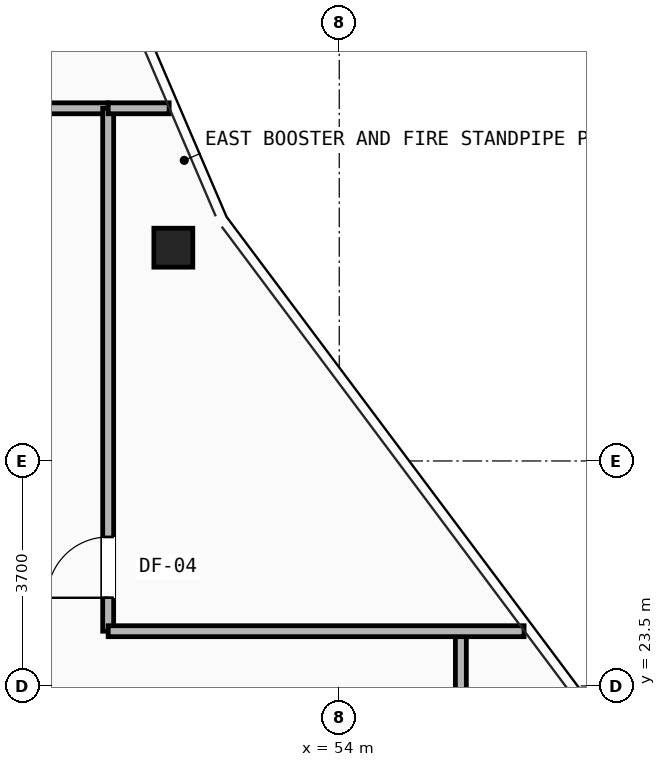
"""IFC4 building model, lengths in metres.
Left out: names, types, materials, properties, quantities, classifications, styles, units other than length and angle.
Written with IfcOpenShell. Run it as: python <this file> out.ifc"""

import sys

from ifc_helpers import new_model, si_unit, direction, frame, frame_2d, origin, origin_2d, place, context, subcontext, project, spatial, rectangle, hollow_rectangle, extrude, element, fill, save


model = new_model("IFC4")
c1 = context("Model", 3, precision=1e-05, world=origin(), true_north=direction((0.0, 1.0)))
c2 = subcontext(c1, "Body", "Model", "MODEL_VIEW")
j1 = project(units=[si_unit("LENGTHUNIT", "METRE"), si_unit("PLANEANGLEUNIT", "RADIAN")], contexts=[c1])
p1 = place(None, origin())
s1 = spatial("IfcSite", under=j1, at=p1, CompositionType="ELEMENT")
p2 = place(p1, origin())
s2 = spatial("IfcBuilding", under=s1, at=p2, CompositionType="ELEMENT")
p3 = place(p2, frame((0.0, 0.0, 290.0)))
s3 = spatial("IfcBuildingStorey", under=s2, at=p3, CompositionType="ELEMENT", Elevation=290.0)
p4 = place(p3, frame((51.271, 30.708, 0.0), z_axis=(0.0, 0.0, 1.0), x_axis=(1.0, 0.0, 0.0)))
e1 = element("IfcColumn", 1, at=p4, inside=s3, PredefinedType="COLUMN", context=c2, shape_type="SweptSolid", body=[
    extrude(hollow_rectangle(XDim=0.64, YDim=0.64, WallThickness=0.045, at=origin_2d()), origin(), (0.0, 0.0, 1.0), 4.8),
])
p5 = place(p3, frame((29.8, 33.0, 0.0), z_axis=(0.0, 0.0, 1.0), x_axis=(1.0, 0.0, 0.0)))
e2 = element("IfcWall", 2, at=p5, inside=s3, PredefinedType="PARTITIONING", context=c2, shape_type="SweptSolid", body=[
    extrude(rectangle(XDim=20.4, YDim=0.18, at=frame_2d((10.2, 0.0))), origin(), (0.0, 0.0, 1.0), 3.918),
])
p6 = place(p5, frame((3.4, 0.0, 0.0)))
e3 = element("IfcOpeningElement", 3, at=p6, cuts=e2, PredefinedType="OPENING", context=c2, shape_type="SweptSolid", body=[
    extrude(rectangle(XDim=1.0, YDim=2.15, at=frame_2d((0.5, 1.075))), frame((0.0, 0.1, 0.0), z_axis=(0.0, -1.0, 0.0), x_axis=(1.0, 0.0, 0.0)), (0.0, 0.0, 1.0), 0.2),
])
p7 = place(p5, frame((6.8, 0.0, 0.0)))
e4 = element("IfcOpeningElement", 4, at=p7, cuts=e2, PredefinedType="OPENING", context=c2, shape_type="SweptSolid", body=[
    extrude(rectangle(XDim=1.0, YDim=2.15, at=frame_2d((0.5, 1.075))), frame((0.0, 0.1, 0.0), z_axis=(0.0, -1.0, 0.0), x_axis=(1.0, 0.0, 0.0)), (0.0, 0.0, 1.0), 0.2),
])
p8 = place(p5, frame((11.4, 0.0, 0.0)))
e5 = element("IfcOpeningElement", 5, at=p8, cuts=e2, PredefinedType="OPENING", context=c2, shape_type="SweptSolid", body=[
    extrude(rectangle(XDim=1.0, YDim=2.15, at=frame_2d((0.5, 1.075))), frame((0.0, 0.1, 0.0), z_axis=(0.0, -1.0, 0.0), x_axis=(1.0, 0.0, 0.0)), (0.0, 0.0, 1.0), 0.2),
])
p9 = place(p5, frame((16.0, 0.0, 0.0)))
e6 = element("IfcOpeningElement", 6, at=p9, cuts=e2, PredefinedType="OPENING", context=c2, shape_type="SweptSolid", body=[
    extrude(rectangle(XDim=1.0, YDim=2.15, at=frame_2d((0.5, 1.075))), frame((0.0, 0.1, 0.0), z_axis=(0.0, -1.0, 0.0), x_axis=(1.0, 0.0, 0.0)), (0.0, 0.0, 1.0), 0.2),
])
p10 = place(p3, frame((50.2, 24.4, 0.0), z_axis=(0.0, 0.0, 1.0), x_axis=(0.0, 1.0, 0.0)))
e7 = element("IfcWall", 7, at=p10, inside=s3, PredefinedType="PARTITIONING", context=c2, shape_type="SweptSolid", body=[
    extrude(rectangle(XDim=8.6, YDim=0.18, at=frame_2d((4.3, 0.0))), origin(), (0.0, 0.0, 1.0), 3.582),
])
p11 = place(p10, frame((0.55, 0.0, 0.0)))
e8 = element("IfcOpeningElement", 8, at=p11, cuts=e7, PredefinedType="OPENING", context=c2, shape_type="SweptSolid", body=[
    extrude(rectangle(XDim=1.0, YDim=2.15, at=frame_2d((0.5, 1.075))), frame((0.0, 0.1, 0.0), z_axis=(0.0, -1.0, 0.0), x_axis=(1.0, 0.0, 0.0)), (0.0, 0.0, 1.0), 0.2),
])
p12 = place(p3, frame((56.0, 14.2, 0.0), z_axis=(0.0, 0.0, 1.0), x_axis=(0.0, 1.0, 0.0)))
e9 = element("IfcWall", 9, at=p12, inside=s3, PredefinedType="PARTITIONING", context=c2, shape_type="SweptSolid", body=[
    extrude(rectangle(XDim=10.2, YDim=0.18, at=frame_2d((5.1, 0.0))), origin(), (0.0, 0.0, 1.0), 3.918),
])
p13 = place(p3, frame((50.2, 24.4, 0.0), z_axis=(0.0, 0.0, 1.0), x_axis=(1.0, 0.0, 0.0)))
e10 = element("IfcWall", 10, at=p13, inside=s3, PredefinedType="PARTITIONING", context=c2, shape_type="SweptSolid", body=[
    extrude(rectangle(XDim=6.84, YDim=0.18, at=frame_2d((3.42, 0.0))), origin(), (0.0, 0.0, 1.0), 3.918),
])
p14 = place(p3, frame((50.2, 33.0, 0.0), z_axis=(0.0, 0.0, 1.0), x_axis=(1.0, 0.0, 0.0)))
e11 = element("IfcWall", 11, at=p14, inside=s3, PredefinedType="PARTITIONING", context=c2, shape_type="SweptSolid", body=[
    extrude(rectangle(XDim=1.003, YDim=0.18, at=frame_2d((0.501, 0.0))), origin(), (0.0, 0.0, 1.0), 3.918),
])
p15 = place(p11, origin())
e12 = element("IfcDoor", 12, at=p15, inside=s3, OperationType="SINGLE_SWING_LEFT", PredefinedType="DOOR", context=c2, shape_type="SweptSolid", body=[
    extrude(rectangle(XDim=1.0, YDim=2.15, at=frame_2d((0.5, 1.075))), frame((0.0, 0.025, 0.0), z_axis=(0.0, -1.0, 0.0), x_axis=(1.0, 0.0, 0.0)), (0.0, 0.0, 1.0), 0.05),
])
fill(e8, e12)
save(model, sys.argv[1])
